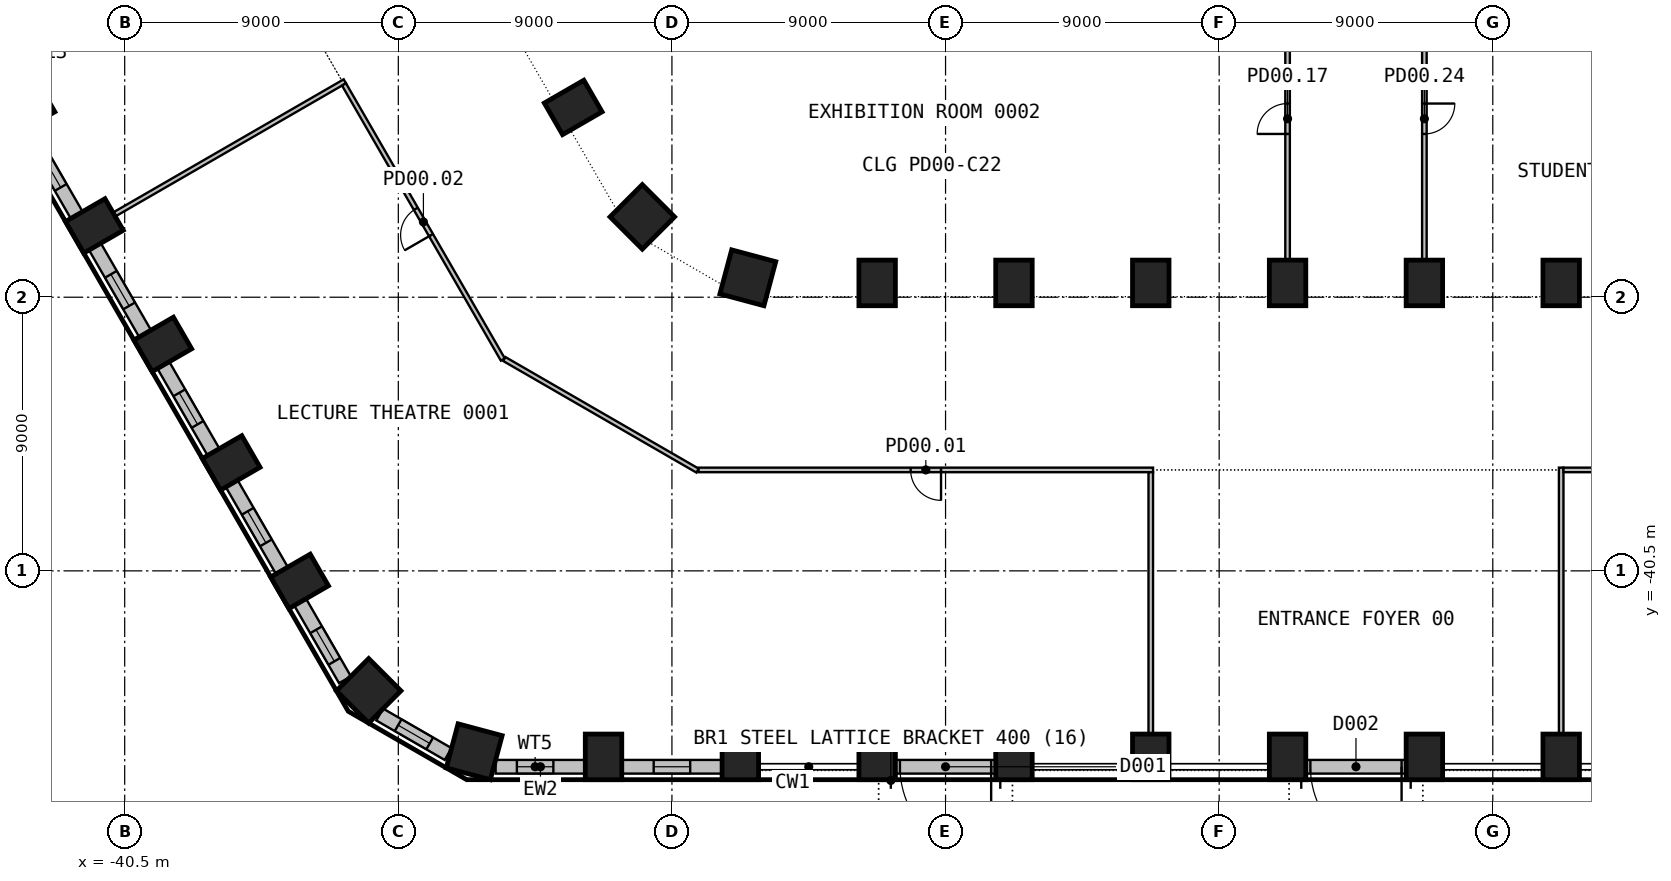
"""IFC4 building model, lengths in metres.
Left out: names, types, materials, properties, quantities, classifications, styles, units other than length and angle.
Written with IfcOpenShell. Run it as: python <this file> out.ifc"""

import sys

from ifc_helpers import new_model, si_unit, direction, frame, frame_2d, origin, origin_2d, place, context, subcontext, project, spatial, rectangle, extrude, element, fill, save


model = new_model("IFC4")
c1 = context("Model", 3, precision=1e-05, world=origin(), true_north=direction((0.0, 1.0)))
c2 = subcontext(c1, "Body", "Model", "MODEL_VIEW")
j1 = project(units=[si_unit("LENGTHUNIT", "METRE"), si_unit("PLANEANGLEUNIT", "RADIAN")], contexts=[c1])
p1 = place(None, origin())
s1 = spatial("IfcSite", under=j1, at=p1, CompositionType="ELEMENT")
p2 = place(p1, origin())
s2 = spatial("IfcBuilding", under=s1, at=p2, CompositionType="ELEMENT")
p3 = place(p2, origin())
s3 = spatial("IfcBuildingStorey", under=s2, at=p3, CompositionType="ELEMENT", Elevation=0.0)
p4 = place(p3, frame((-29.004, -46.45, 0.0), z_axis=(0.0, 0.0, 1.0), x_axis=(0.965925826289, -0.258819045103, 0.0)))
e1 = element("IfcColumn", 1, at=p4, inside=s3, PredefinedType="COLUMN", context=c2, shape_type="SweptSolid", body=[
    extrude(rectangle(XDim=1.5, YDim=1.5, at=origin_2d()), origin(), (0.0, 0.0, 1.0), 6.0),
])
for number, where, z_axis, x_axis in (
    (2, (-24.75, -46.618, 0.0), (0.0, 0.0, 1.0), (1.0, 0.0, 0.0)),
    (3, (-20.25, -46.618, 0.0), (0.0, 0.0, 1.0), (1.0, 0.0, 0.0)),
    (4, (-15.75, -46.618, 0.0), (0.0, 0.0, 1.0), (1.0, 0.0, 0.0)),
    (5, (-11.25, -46.618, 0.0), (0.0, 0.0, 1.0), (1.0, 0.0, 0.0)),
    (6, (-6.75, -46.618, 0.0), (0.0, 0.0, 1.0), (1.0, 0.0, 0.0)),
    (7, (-2.25, -46.618, 0.0), (0.0, 0.0, 1.0), (1.0, 0.0, 0.0)),
    (8, (2.25, -46.618, 0.0), (0.0, 0.0, 1.0), (1.0, 0.0, 0.0)),
    (9, (6.75, -46.618, 0.0), (0.0, 0.0, 1.0), (1.0, 0.0, 0.0)),
    (10, (-43.748, -25.258, 0.0), (0.0, 0.0, 1.0), (0.5, -0.866, 0.0)),
    (11, (-41.498, -29.155, 0.0), (0.0, 0.0, 1.0), (0.5, -0.866, 0.0)),
    (12, (-39.248, -33.052, 0.0), (0.0, 0.0, 1.0), (0.5, -0.866, 0.0)),
    (13, (-36.998, -36.949, 0.0), (0.0, 0.0, 1.0), (0.5, -0.866, 0.0)),
    (14, (-34.748, -40.846, 0.0), (0.0, 0.0, 1.0), (0.5, -0.866, 0.0)),
):
    element("IfcColumn", number, at=place(p3, frame(where, z_axis=z_axis, x_axis=x_axis)), inside=s3, PredefinedType="COLUMN", context=c2, shape_type="SweptSolid", body=[
        extrude(rectangle(XDim=1.2, YDim=1.5, at=origin_2d()), origin(), (0.0, 0.0, 1.0), 6.0),
    ])
p5 = place(p3, frame((-32.475, -44.446, 0.0), z_axis=(0.0, 0.0, 1.0), x_axis=(0.707106781187, -0.707106781187, 0.0)))
e15 = element("IfcColumn", 15, at=p5, inside=s3, PredefinedType="COLUMN", context=c2, shape_type="SweptSolid", body=[
    extrude(rectangle(XDim=1.5, YDim=1.5, at=origin_2d()), origin(), (0.0, 0.0, 1.0), 6.0),
])
p6 = place(p3, frame((-20.004, -30.861, 0.0), z_axis=(0.0, 0.0, 1.0), x_axis=(0.965925826289, -0.258819045103, 0.0)))
e16 = element("IfcColumn", 16, at=p6, inside=s3, PredefinedType="COLUMN", context=c2, shape_type="SweptSolid", body=[
    extrude(rectangle(XDim=1.5, YDim=1.5, at=origin_2d()), origin(), (0.0, 0.0, 1.0), 5.6),
])
for number, where, z_axis, x_axis in (
    (17, (-15.75, -31.03, 0.0), (0.0, 0.0, 1.0), (1.0, 0.0, 0.0)),
    (18, (-11.25, -31.03, 0.0), (0.0, 0.0, 1.0), (1.0, 0.0, 0.0)),
    (19, (-6.75, -31.03, 0.0), (0.0, 0.0, 1.0), (1.0, 0.0, 0.0)),
    (20, (-2.25, -31.03, 0.0), (0.0, 0.0, 1.0), (1.0, 0.0, 0.0)),
    (21, (2.25, -31.03, 0.0), (0.0, 0.0, 1.0), (1.0, 0.0, 0.0)),
    (22, (6.75, -31.03, 0.0), (0.0, 0.0, 1.0), (1.0, 0.0, 0.0)),
    (23, (-25.748, -25.258, 0.0), (0.0, 0.0, 1.0), (0.5, -0.866, 0.0)),
):
    element("IfcColumn", number, at=place(p3, frame(where, z_axis=z_axis, x_axis=x_axis)), inside=s3, PredefinedType="COLUMN", context=c2, shape_type="SweptSolid", body=[
        extrude(rectangle(XDim=1.2, YDim=1.5, at=origin_2d()), origin(), (0.0, 0.0, 1.0), 5.6),
    ])
p7 = place(p3, frame((-23.475, -28.857, 0.0), z_axis=(0.0, 0.0, 1.0), x_axis=(0.707106781187, -0.707106781187, 0.0)))
e24 = element("IfcColumn", 24, at=p7, inside=s3, PredefinedType="COLUMN", context=c2, shape_type="SweptSolid", body=[
    extrude(rectangle(XDim=1.5, YDim=1.5, at=origin_2d()), origin(), (0.0, 0.0, 1.0), 5.6),
])
p8 = place(p3, frame((-28.299, -46.943, 0.0), z_axis=(0.0, 0.0, 1.0), x_axis=(1.0, 0.0, 0.0)))
e25 = element("IfcWall", 25, at=p8, inside=s3, PredefinedType="SOLIDWALL", context=c2, shape_type="SweptSolid", body=[
    extrude(rectangle(XDim=2.948, YDim=0.45, at=frame_2d((1.474, 0.0))), origin(), (0.0, 0.0, 1.0), 6.0),
])
p9 = place(p8, frame((0.699, 0.0, 0.9)))
e26 = element("IfcOpeningElement", 26, at=p9, cuts=e25, PredefinedType="OPENING", context=c2, shape_type="SweptSolid", body=[
    extrude(rectangle(XDim=1.2, YDim=4.2, at=frame_2d((0.6, 2.1))), frame((0.0, 0.235, 0.0), z_axis=(0.0, -1.0, 0.0), x_axis=(1.0, 0.0, 0.0)), (0.0, 0.0, 1.0), 0.47),
])
p10 = place(p3, frame((-24.149, -46.943, 0.0), z_axis=(0.0, 0.0, 1.0), x_axis=(1.0, 0.0, 0.0)))
e27 = element("IfcWall", 27, at=p10, inside=s3, PredefinedType="SOLIDWALL", context=c2, shape_type="SweptSolid", body=[
    extrude(rectangle(XDim=3.299, YDim=0.45, at=frame_2d((1.649, 0.0))), origin(), (0.0, 0.0, 1.0), 6.0),
])
p11 = place(p10, frame((1.05, 0.0, 0.9)))
e28 = element("IfcOpeningElement", 28, at=p11, cuts=e27, PredefinedType="OPENING", context=c2, shape_type="SweptSolid", body=[
    extrude(rectangle(XDim=1.2, YDim=4.2, at=frame_2d((0.6, 2.1))), frame((0.0, 0.235, 0.0), z_axis=(0.0, -1.0, 0.0), x_axis=(1.0, 0.0, 0.0)), (0.0, 0.0, 1.0), 0.47),
])
p12 = place(p3, frame((-11.851, -46.943, 0.0), z_axis=(0.0, 0.0, 1.0), x_axis=(-1.0, 0.0, 0.0)))
e29 = element("IfcWall", 29, at=p12, inside=s3, PredefinedType="SOLIDWALL", context=c2, shape_type="SweptSolid", body=[
    extrude(rectangle(XDim=3.299, YDim=0.45, at=frame_2d((1.649, 0.0))), origin(), (0.0, 0.0, 1.0), 6.0),
])
p13 = place(p12, frame((0.149, 0.0, 0.0)))
e30 = element("IfcOpeningElement", 30, at=p13, cuts=e29, PredefinedType="OPENING", context=c2, shape_type="SweptSolid", body=[
    extrude(rectangle(XDim=3.0, YDim=4.2, at=frame_2d((1.5, 2.1))), frame((0.0, 0.235, 0.0), z_axis=(0.0, -1.0, 0.0), x_axis=(1.0, 0.0, 0.0)), (0.0, 0.0, 1.0), 0.47),
])
p14 = place(p3, frame((1.649, -46.943, 0.0), z_axis=(0.0, 0.0, 1.0), x_axis=(-1.0, 0.0, 0.0)))
e31 = element("IfcWall", 31, at=p14, inside=s3, PredefinedType="SOLIDWALL", context=c2, shape_type="SweptSolid", body=[
    extrude(rectangle(XDim=3.299, YDim=0.45, at=frame_2d((1.649, 0.0))), origin(), (0.0, 0.0, 1.0), 6.0),
])
p15 = place(p14, frame((0.149, 0.0, 0.0)))
e32 = element("IfcOpeningElement", 32, at=p15, cuts=e31, PredefinedType="OPENING", context=c2, shape_type="SweptSolid", body=[
    extrude(rectangle(XDim=3.0, YDim=4.2, at=frame_2d((1.5, 2.1))), frame((0.0, 0.235, 0.0), z_axis=(0.0, -1.0, 0.0), x_axis=(1.0, 0.0, 0.0)), (0.0, 0.0, 1.0), 0.47),
])
p16 = place(p3, frame((-43.729, -25.94, 0.0), z_axis=(0.0, 0.0, 1.0), x_axis=(0.49995947208, -0.866048801325, 0.0)))
e33 = element("IfcWall", 33, at=p16, inside=s3, PredefinedType="SOLIDWALL", context=c2, shape_type="SweptSolid", body=[
    extrude(rectangle(XDim=3.299, YDim=0.45, at=frame_2d((1.649, 0.0))), origin(), (0.0, 0.0, 1.0), 6.0),
])
p17 = place(p16, frame((1.05, 0.0, 0.9)))
e34 = element("IfcOpeningElement", 34, at=p17, cuts=e33, PredefinedType="OPENING", context=c2, shape_type="SweptSolid", body=[
    extrude(rectangle(XDim=1.2, YDim=4.2, at=frame_2d((0.6, 2.1))), frame((0.0, 0.235, 0.0), z_axis=(0.0, -1.0, 0.0), x_axis=(1.0, 0.0, 0.0)), (0.0, 0.0, 1.0), 0.47),
])
p18 = place(p3, frame((-41.479, -29.837, 0.0), z_axis=(0.0, 0.0, 1.0), x_axis=(0.499991515992, -0.866030301974, 0.0)))
e35 = element("IfcWall", 35, at=p18, inside=s3, PredefinedType="SOLIDWALL", context=c2, shape_type="SweptSolid", body=[
    extrude(rectangle(XDim=3.299, YDim=0.45, at=frame_2d((1.649, 0.0))), origin(), (0.0, 0.0, 1.0), 6.0),
])
p19 = place(p18, frame((1.05, 0.0, 0.9)))
e36 = element("IfcOpeningElement", 36, at=p19, cuts=e35, PredefinedType="OPENING", context=c2, shape_type="SweptSolid", body=[
    extrude(rectangle(XDim=1.2, YDim=4.2, at=frame_2d((0.6, 2.1))), frame((0.0, 0.235, 0.0), z_axis=(0.0, -1.0, 0.0), x_axis=(1.0, 0.0, 0.0)), (0.0, 0.0, 1.0), 0.47),
])
p20 = place(p3, frame((-39.229, -33.735, 0.0), z_axis=(0.0, 0.0, 1.0), x_axis=(0.499991515992, -0.866030301974, 0.0)))
e37 = element("IfcWall", 37, at=p20, inside=s3, PredefinedType="SOLIDWALL", context=c2, shape_type="SweptSolid", body=[
    extrude(rectangle(XDim=3.299, YDim=0.45, at=frame_2d((1.649, 0.0))), origin(), (0.0, 0.0, 1.0), 6.0),
])
p21 = place(p20, frame((1.05, 0.0, 0.9)))
e38 = element("IfcOpeningElement", 38, at=p21, cuts=e37, PredefinedType="OPENING", context=c2, shape_type="SweptSolid", body=[
    extrude(rectangle(XDim=1.2, YDim=4.2, at=frame_2d((0.6, 2.1))), frame((0.0, 0.235, 0.0), z_axis=(0.0, -1.0, 0.0), x_axis=(1.0, 0.0, 0.0)), (0.0, 0.0, 1.0), 0.47),
])
p22 = place(p3, frame((-36.979, -37.632, 0.0), z_axis=(0.0, 0.0, 1.0), x_axis=(0.499991515992, -0.866030301974, 0.0)))
e39 = element("IfcWall", 39, at=p22, inside=s3, PredefinedType="SOLIDWALL", context=c2, shape_type="SweptSolid", body=[
    extrude(rectangle(XDim=3.299, YDim=0.45, at=frame_2d((1.649, 0.0))), origin(), (0.0, 0.0, 1.0), 6.0),
])
p23 = place(p22, frame((1.05, 0.0, 0.9)))
e40 = element("IfcOpeningElement", 40, at=p23, cuts=e39, PredefinedType="OPENING", context=c2, shape_type="SweptSolid", body=[
    extrude(rectangle(XDim=1.2, YDim=4.2, at=frame_2d((0.6, 2.1))), frame((0.0, 0.235, 0.0), z_axis=(0.0, -1.0, 0.0), x_axis=(1.0, 0.0, 0.0)), (0.0, 0.0, 1.0), 0.47),
])
p24 = place(p3, frame((-34.729, -41.529, 0.0), z_axis=(0.0, 0.0, 1.0), x_axis=(0.500030648271, -0.866007708274, 0.0)))
e41 = element("IfcWall", 41, at=p24, inside=s3, PredefinedType="SOLIDWALL", context=c2, shape_type="SweptSolid", body=[
    extrude(rectangle(XDim=2.948, YDim=0.45, at=frame_2d((1.474, 0.0))), origin(), (0.0, 0.0, 1.0), 6.0),
])
p25 = place(p24, frame((1.05, 0.0, 0.9)))
e42 = element("IfcOpeningElement", 42, at=p25, cuts=e41, PredefinedType="OPENING", context=c2, shape_type="SweptSolid", body=[
    extrude(rectangle(XDim=1.2, YDim=4.2, at=frame_2d((0.6, 2.1))), frame((0.0, 0.235, 0.0), z_axis=(0.0, -1.0, 0.0), x_axis=(1.0, 0.0, 0.0)), (0.0, 0.0, 1.0), 0.47),
])
p26 = place(p3, frame((-32.111, -45.226, 0.0), z_axis=(0.0, 0.0, 1.0), x_axis=(0.866019710441, -0.50000986103, 0.0)))
e43 = element("IfcWall", 43, at=p26, inside=s3, PredefinedType="SOLIDWALL", context=c2, shape_type="SweptSolid", body=[
    extrude(rectangle(XDim=2.598, YDim=0.45, at=frame_2d((1.299, 0.0))), origin(), (0.0, 0.0, 1.0), 6.0),
])
p27 = place(p26, frame((0.699, 0.0, 0.9)))
e44 = element("IfcOpeningElement", 44, at=p27, cuts=e43, PredefinedType="OPENING", context=c2, shape_type="SweptSolid", body=[
    extrude(rectangle(XDim=1.2, YDim=4.2, at=frame_2d((0.6, 2.1))), frame((0.0, 0.235, 0.0), z_axis=(0.0, -1.0, 0.0), x_axis=(1.0, 0.0, 0.0)), (0.0, 0.0, 1.0), 0.47),
])
p28 = place(p3, frame((-33.259, -24.398, 0.0), z_axis=(0.0, 0.0, 1.0), x_axis=(-0.866017712198, -0.500013321982, 0.0)))
e45 = element("IfcWall", 45, at=p28, inside=s3, PredefinedType="PARTITIONING", context=c2, shape_type="SweptSolid", body=[
    extrude(rectangle(XDim=8.743, YDim=0.15, at=frame_2d((4.372, 0.0))), origin(), (0.0, 0.0, 1.0), 6.0),
])
p29 = place(p3, frame((-28.062, -33.548, 0.0), z_axis=(0.0, 0.0, 1.0), x_axis=(-0.500064997195, 0.865987874384, 0.0)))
e46 = element("IfcWall", 46, at=p29, inside=s3, PredefinedType="PARTITIONING", context=c2, shape_type="SweptSolid", body=[
    extrude(rectangle(XDim=10.447, YDim=0.15, at=frame_2d((5.223, 0.0))), origin(), (0.0, 0.0, 1.0), 6.0),
])
p30 = place(p29, frame((4.723, 0.0, 0.0)))
e47 = element("IfcOpeningElement", 47, at=p30, cuts=e46, PredefinedType="OPENING", context=c2, shape_type="SweptSolid", body=[
    extrude(rectangle(XDim=1.0, YDim=2.1, at=frame_2d((0.5, 1.05))), frame((0.0, 0.085, 0.0), z_axis=(0.0, -1.0, 0.0), x_axis=(1.0, 0.0, 0.0)), (0.0, 0.0, 1.0), 0.17),
])
p31 = place(p3, frame((-21.658, -37.202, 0.0), z_axis=(0.0, 0.0, 1.0), x_axis=(-0.866011067739, 0.500024829938, 0.0)))
e48 = element("IfcWall", 48, at=p31, inside=s3, PredefinedType="PARTITIONING", context=c2, shape_type="SweptSolid", body=[
    extrude(rectangle(XDim=7.339, YDim=0.15, at=frame_2d((3.669, 0.0))), origin(), (0.0, 0.0, 1.0), 6.0),
])
p32 = place(p3, frame((-6.675, -37.18, 0.0), z_axis=(0.0, 0.0, 1.0), x_axis=(-1.0, 0.0, 0.0)))
e49 = element("IfcWall", 49, at=p32, inside=s3, PredefinedType="PARTITIONING", context=c2, shape_type="SweptSolid", body=[
    extrude(rectangle(XDim=14.947, YDim=0.15, at=frame_2d((7.474, 0.0))), origin(), (0.0, 0.0, 1.0), 6.0),
])
p33 = place(p32, frame((6.973, 0.0, 0.0)))
e50 = element("IfcOpeningElement", 50, at=p33, cuts=e49, PredefinedType="OPENING", context=c2, shape_type="SweptSolid", body=[
    extrude(rectangle(XDim=1.0, YDim=2.1, at=frame_2d((0.5, 1.05))), frame((0.0, 0.085, 0.0), z_axis=(0.0, -1.0, 0.0), x_axis=(1.0, 0.0, 0.0)), (0.0, 0.0, 1.0), 0.17),
])
p34 = place(p3, frame((-6.75, -45.848, 0.0), z_axis=(0.0, 0.0, 1.0), x_axis=(0.0, 1.0, 0.0)))
e51 = element("IfcWall", 51, at=p34, inside=s3, PredefinedType="PARTITIONING", context=c2, shape_type="SweptSolid", body=[
    extrude(rectangle(XDim=8.594, YDim=0.15, at=frame_2d((4.297, 0.0))), origin(), (0.0, 0.0, 1.0), 6.0),
])
p35 = place(p3, frame((-2.25, -30.26, 0.0), z_axis=(0.0, 0.0, 1.0), x_axis=(0.0, 1.0, 0.0)))
e52 = element("IfcWall", 52, at=p35, inside=s3, PredefinedType="PARTITIONING", context=c2, shape_type="SweptSolid", body=[
    extrude(rectangle(XDim=9.26, YDim=0.15, at=frame_2d((4.63, 0.0))), origin(), (0.0, 0.0, 1.0), 5.6),
])
p36 = place(p35, frame((4.13, 0.0, 0.0)))
e53 = element("IfcOpeningElement", 53, at=p36, cuts=e52, PredefinedType="OPENING", context=c2, shape_type="SweptSolid", body=[
    extrude(rectangle(XDim=1.0, YDim=2.1, at=frame_2d((0.5, 1.05))), frame((0.0, 0.085, 0.0), z_axis=(0.0, -1.0, 0.0), x_axis=(1.0, 0.0, 0.0)), (0.0, 0.0, 1.0), 0.17),
])
p37 = place(p3, frame((2.25, -21.0, 0.0), z_axis=(0.0, 0.0, 1.0), x_axis=(0.0, -1.0, 0.0)))
e54 = element("IfcWall", 54, at=p37, inside=s3, PredefinedType="PARTITIONING", context=c2, shape_type="SweptSolid", body=[
    extrude(rectangle(XDim=9.26, YDim=0.15, at=frame_2d((4.63, 0.0))), origin(), (0.0, 0.0, 1.0), 5.6),
])
p38 = place(p37, frame((4.13, 0.0, 0.0)))
e55 = element("IfcOpeningElement", 55, at=p38, cuts=e54, PredefinedType="OPENING", context=c2, shape_type="SweptSolid", body=[
    extrude(rectangle(XDim=1.0, YDim=2.1, at=frame_2d((0.5, 1.05))), frame((0.0, 0.085, 0.0), z_axis=(0.0, -1.0, 0.0), x_axis=(1.0, 0.0, 0.0)), (0.0, 0.0, 1.0), 0.17),
])
p39 = place(p3, frame((6.75, -37.105, 0.0), z_axis=(0.0, 0.0, 1.0), x_axis=(0.0, -1.0, 0.0)))
e56 = element("IfcWall", 56, at=p39, inside=s3, PredefinedType="PARTITIONING", context=c2, shape_type="SweptSolid", body=[
    extrude(rectangle(XDim=8.743, YDim=0.15, at=frame_2d((4.372, 0.0))), origin(), (0.0, 0.0, 1.0), 6.0),
])
p40 = place(p3, frame((21.772, -37.18, 0.0), z_axis=(0.0, 0.0, 1.0), x_axis=(-1.0, 0.0, 0.0)))
e57 = element("IfcWall", 57, at=p40, inside=s3, PredefinedType="PARTITIONING", context=c2, shape_type="SweptSolid", body=[
    extrude(rectangle(XDim=14.947, YDim=0.15, at=frame_2d((7.474, 0.0))), origin(), (0.0, 0.0, 1.0), 6.0),
])
p41 = place(p40, frame((6.973, 0.0, 0.0)))
e58 = element("IfcOpeningElement", 58, at=p41, cuts=e57, PredefinedType="OPENING", context=c2, shape_type="SweptSolid", body=[
    extrude(rectangle(XDim=1.0, YDim=2.1, at=frame_2d((0.5, 1.05))), frame((0.0, 0.085, 0.0), z_axis=(0.0, -1.0, 0.0), x_axis=(1.0, 0.0, 0.0)), (0.0, 0.0, 1.0), 0.17),
])
p42 = place(p9, origin())
e59 = element("IfcWindow", 59, at=p42, inside=s3, PartitioningType="SINGLE_PANEL", PredefinedType="WINDOW", context=c2, shape_type="SweptSolid", body=[
    extrude(rectangle(XDim=1.2, YDim=4.2, at=frame_2d((0.6, 2.1))), frame((0.0, 0.03, 0.0), z_axis=(0.0, -1.0, 0.0), x_axis=(1.0, 0.0, 0.0)), (0.0, 0.0, 1.0), 0.06),
])
fill(e26, e59)
p43 = place(p11, origin())
e60 = element("IfcWindow", 60, at=p43, inside=s3, PartitioningType="SINGLE_PANEL", PredefinedType="WINDOW", context=c2, shape_type="SweptSolid", body=[
    extrude(rectangle(XDim=1.2, YDim=4.2, at=frame_2d((0.6, 2.1))), frame((0.0, 0.03, 0.0), z_axis=(0.0, -1.0, 0.0), x_axis=(1.0, 0.0, 0.0)), (0.0, 0.0, 1.0), 0.06),
])
fill(e28, e60)
p44 = place(p13, origin())
e61 = element("IfcDoor", 61, at=p44, inside=s3, OperationType="DOUBLE_DOOR_SINGLE_SWING", PredefinedType="DOOR", context=c2, shape_type="SweptSolid", body=[
    extrude(rectangle(XDim=3.0, YDim=4.2, at=frame_2d((1.5, 2.1))), frame((0.0, 0.025, 0.0), z_axis=(0.0, -1.0, 0.0), x_axis=(1.0, 0.0, 0.0)), (0.0, 0.0, 1.0), 0.05),
])
fill(e30, e61)
p45 = place(p15, origin())
e62 = element("IfcDoor", 62, at=p45, inside=s3, OperationType="DOUBLE_DOOR_SINGLE_SWING", PredefinedType="DOOR", context=c2, shape_type="SweptSolid", body=[
    extrude(rectangle(XDim=3.0, YDim=4.2, at=frame_2d((1.5, 2.1))), frame((0.0, 0.025, 0.0), z_axis=(0.0, -1.0, 0.0), x_axis=(1.0, 0.0, 0.0)), (0.0, 0.0, 1.0), 0.05),
])
fill(e32, e62)
p46 = place(p17, origin())
e63 = element("IfcWindow", 63, at=p46, inside=s3, PartitioningType="SINGLE_PANEL", PredefinedType="WINDOW", context=c2, shape_type="SweptSolid", body=[
    extrude(rectangle(XDim=1.2, YDim=4.2, at=frame_2d((0.6, 2.1))), frame((0.0, 0.03, 0.0), z_axis=(0.0, -1.0, 0.0), x_axis=(1.0, 0.0, 0.0)), (0.0, 0.0, 1.0), 0.06),
])
fill(e34, e63)
p47 = place(p19, origin())
e64 = element("IfcWindow", 64, at=p47, inside=s3, PartitioningType="SINGLE_PANEL", PredefinedType="WINDOW", context=c2, shape_type="SweptSolid", body=[
    extrude(rectangle(XDim=1.2, YDim=4.2, at=frame_2d((0.6, 2.1))), frame((0.0, 0.03, 0.0), z_axis=(0.0, -1.0, 0.0), x_axis=(1.0, 0.0, 0.0)), (0.0, 0.0, 1.0), 0.06),
])
fill(e36, e64)
p48 = place(p21, origin())
e65 = element("IfcWindow", 65, at=p48, inside=s3, PartitioningType="SINGLE_PANEL", PredefinedType="WINDOW", context=c2, shape_type="SweptSolid", body=[
    extrude(rectangle(XDim=1.2, YDim=4.2, at=frame_2d((0.6, 2.1))), frame((0.0, 0.03, 0.0), z_axis=(0.0, -1.0, 0.0), x_axis=(1.0, 0.0, 0.0)), (0.0, 0.0, 1.0), 0.06),
])
fill(e38, e65)
p49 = place(p23, origin())
e66 = element("IfcWindow", 66, at=p49, inside=s3, PartitioningType="SINGLE_PANEL", PredefinedType="WINDOW", context=c2, shape_type="SweptSolid", body=[
    extrude(rectangle(XDim=1.2, YDim=4.2, at=frame_2d((0.6, 2.1))), frame((0.0, 0.03, 0.0), z_axis=(0.0, -1.0, 0.0), x_axis=(1.0, 0.0, 0.0)), (0.0, 0.0, 1.0), 0.06),
])
fill(e40, e66)
p50 = place(p25, origin())
e67 = element("IfcWindow", 67, at=p50, inside=s3, PartitioningType="SINGLE_PANEL", PredefinedType="WINDOW", context=c2, shape_type="SweptSolid", body=[
    extrude(rectangle(XDim=1.2, YDim=4.2, at=frame_2d((0.6, 2.1))), frame((0.0, 0.03, 0.0), z_axis=(0.0, -1.0, 0.0), x_axis=(1.0, 0.0, 0.0)), (0.0, 0.0, 1.0), 0.06),
])
fill(e42, e67)
p51 = place(p27, origin())
e68 = element("IfcWindow", 68, at=p51, inside=s3, PartitioningType="SINGLE_PANEL", PredefinedType="WINDOW", context=c2, shape_type="SweptSolid", body=[
    extrude(rectangle(XDim=1.2, YDim=4.2, at=frame_2d((0.6, 2.1))), frame((0.0, 0.03, 0.0), z_axis=(0.0, -1.0, 0.0), x_axis=(1.0, 0.0, 0.0)), (0.0, 0.0, 1.0), 0.06),
])
fill(e44, e68)
p52 = place(p33, origin())
e69 = element("IfcDoor", 69, at=p52, inside=s3, OperationType="SINGLE_SWING_LEFT", PredefinedType="DOOR", context=c2, shape_type="SweptSolid", body=[
    extrude(rectangle(XDim=1.0, YDim=2.1, at=frame_2d((0.5, 1.05))), frame((0.0, 0.025, 0.0), z_axis=(0.0, -1.0, 0.0), x_axis=(1.0, 0.0, 0.0)), (0.0, 0.0, 1.0), 0.05),
])
fill(e50, e69)
p53 = place(p30, origin())
e70 = element("IfcDoor", 70, at=p53, inside=s3, OperationType="SINGLE_SWING_RIGHT", PredefinedType="DOOR", context=c2, shape_type="SweptSolid", body=[
    extrude(rectangle(XDim=1.0, YDim=2.1, at=frame_2d((0.5, 1.05))), frame((0.0, 0.025, 0.0), z_axis=(0.0, -1.0, 0.0), x_axis=(1.0, 0.0, 0.0)), (0.0, 0.0, 1.0), 0.05),
])
fill(e47, e70)
p54 = place(p36, origin())
e71 = element("IfcDoor", 71, at=p54, inside=s3, OperationType="SINGLE_SWING_RIGHT", PredefinedType="DOOR", context=c2, shape_type="SweptSolid", body=[
    extrude(rectangle(XDim=1.0, YDim=2.1, at=frame_2d((0.5, 1.05))), frame((0.0, 0.025, 0.0), z_axis=(0.0, -1.0, 0.0), x_axis=(1.0, 0.0, 0.0)), (0.0, 0.0, 1.0), 0.05),
])
fill(e53, e71)
p55 = place(p38, origin())
e72 = element("IfcDoor", 72, at=p55, inside=s3, OperationType="SINGLE_SWING_RIGHT", PredefinedType="DOOR", context=c2, shape_type="SweptSolid", body=[
    extrude(rectangle(XDim=1.0, YDim=2.1, at=frame_2d((0.5, 1.05))), frame((0.0, 0.025, 0.0), z_axis=(0.0, -1.0, 0.0), x_axis=(1.0, 0.0, 0.0)), (0.0, 0.0, 1.0), 0.05),
])
fill(e55, e72)
save(model, sys.argv[1])
